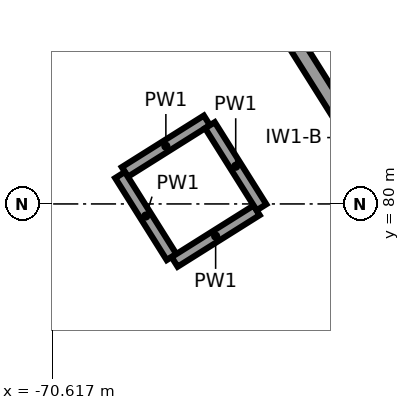
"""IFC4 building model, lengths in metres.
Left out: names, types, materials, properties, quantities, classifications, styles, units other than length and angle.
Written with IfcOpenShell. Run it as: python <this file> out.ifc"""

import sys

from ifc_helpers import new_model, si_unit, direction, frame, frame_2d, origin, place, context, subcontext, project, spatial, rectangle, extrude, element, save


model = new_model("IFC4")
c1 = context("Model", 3, precision=1e-05, world=origin(), true_north=direction((0.0, 1.0)))
c2 = subcontext(c1, "Body", "Model", "MODEL_VIEW")
j1 = project(units=[si_unit("LENGTHUNIT", "METRE"), si_unit("PLANEANGLEUNIT", "RADIAN")], contexts=[c1])
p1 = place(None, origin())
s1 = spatial("IfcSite", under=j1, at=p1, CompositionType="ELEMENT")
p2 = place(p1, origin())
s2 = spatial("IfcBuilding", under=s1, at=p2, CompositionType="ELEMENT")
p3 = place(p2, frame((0.0, 0.0, 18.0)))
s3 = spatial("IfcBuildingStorey", under=s2, at=p3, CompositionType="ELEMENT", Elevation=18.0)
p4 = place(p3, frame((-67.437, 82.143, 0.0), z_axis=(0.0, 0.0, 1.0), x_axis=(0.532038212918, -0.84672034344, 0.0)))
e1 = element("IfcWall", 1, at=p4, inside=s3, PredefinedType="SHEAR", context=c2, shape_type="SweptSolid", body=[
    extrude(rectangle(XDim=3.0, YDim=0.2, at=frame_2d((1.5, 0.0))), origin(), (0.0, 0.0, 1.0), 4.6),
])
for number, where, z_axis, x_axis in (
    (2, (-68.582, 81.099, 0.0), (0.0, 0.0, 1.0), (-0.847, -0.532, 0.0)),
    (3, (-69.725, 80.381, 0.0), (0.0, 0.0, 1.0), (0.532, -0.847, 0.0)),
):
    element("IfcWall", number, at=place(p3, frame(where, z_axis=z_axis, x_axis=x_axis)), inside=s3, PredefinedType="PARTITIONING", context=c2, shape_type="SweptSolid", body=[
        extrude(rectangle(XDim=1.275, YDim=0.15, at=frame_2d((0.638, 0.0))), origin(), (0.0, 0.0, 1.0), 5.6),
    ])
for number, where, z_axis, x_axis in (
    (4, (-69.007, 79.238, 0.0), (0.0, 0.0, 1.0), (0.847, 0.532, 0.0)),
    (5, (-67.864, 79.956, 0.0), (0.0, 0.0, 1.0), (-0.532, 0.847, 0.0)),
):
    element("IfcWall", number, at=place(p3, frame(where, z_axis=z_axis, x_axis=x_axis)), inside=s3, PredefinedType="PARTITIONING", context=c2, shape_type="SweptSolid", body=[
        extrude(rectangle(XDim=1.275, YDim=0.15, at=frame_2d((0.637, 0.0))), origin(), (0.0, 0.0, 1.0), 5.6),
    ])
p5 = place(p3, frame((-72.143, 78.552, 0.0), z_axis=(0.0, 0.0, 1.0), x_axis=(0.53204233593, -0.846717752724, 0.0)))
e6 = element("IfcWall", 6, at=p5, inside=s3, PredefinedType="PARTITIONING", context=c2, shape_type="SweptSolid", body=[
    extrude(rectangle(XDim=5.108, YDim=0.15, at=frame_2d((2.554, 0.0))), origin(), (0.0, 0.0, 1.0), 4.5),
])
p6 = place(p3, frame((-71.996, 78.319, 4.5), z_axis=(0.0, 0.0, 1.0), x_axis=(0.532045320637, -0.84671587725, 0.0)))
e7 = element("IfcWall", 7, at=p6, inside=s3, PredefinedType="PARTITIONING", context=c2, shape_type="SweptSolid", body=[
    extrude(rectangle(XDim=4.833, YDim=0.15, at=frame_2d((2.417, 0.0))), origin(), (0.0, 0.0, 1.0), 1.1),
])
p7 = place(p3, frame((-69.425, 74.227, 0.0), z_axis=(0.0, 0.0, 1.0), x_axis=(0.84672500752, 0.532030790124, 0.0)))
e8 = element("IfcWall", 8, at=p7, inside=s3, PredefinedType="PARTITIONING", context=c2, shape_type="SweptSolid", body=[
    extrude(rectangle(XDim=13.89, YDim=0.15, at=frame_2d((6.945, 0.0))), origin(), (0.0, 0.0, 1.0), 4.894),
])
p8 = place(p3, frame((-69.425, 74.227, 4.894), z_axis=(0.0, 0.0, 1.0), x_axis=(0.846730935514, 0.532021355628, 0.0)))
e9 = element("IfcWall", 9, at=p8, inside=s3, PredefinedType="PARTITIONING", context=c2, shape_type="SweptSolid", body=[
    extrude(rectangle(XDim=9.921, YDim=0.15, at=frame_2d((4.96, 0.0))), origin(), (0.0, 0.0, 1.0), 0.417),
])
save(model, sys.argv[1])
